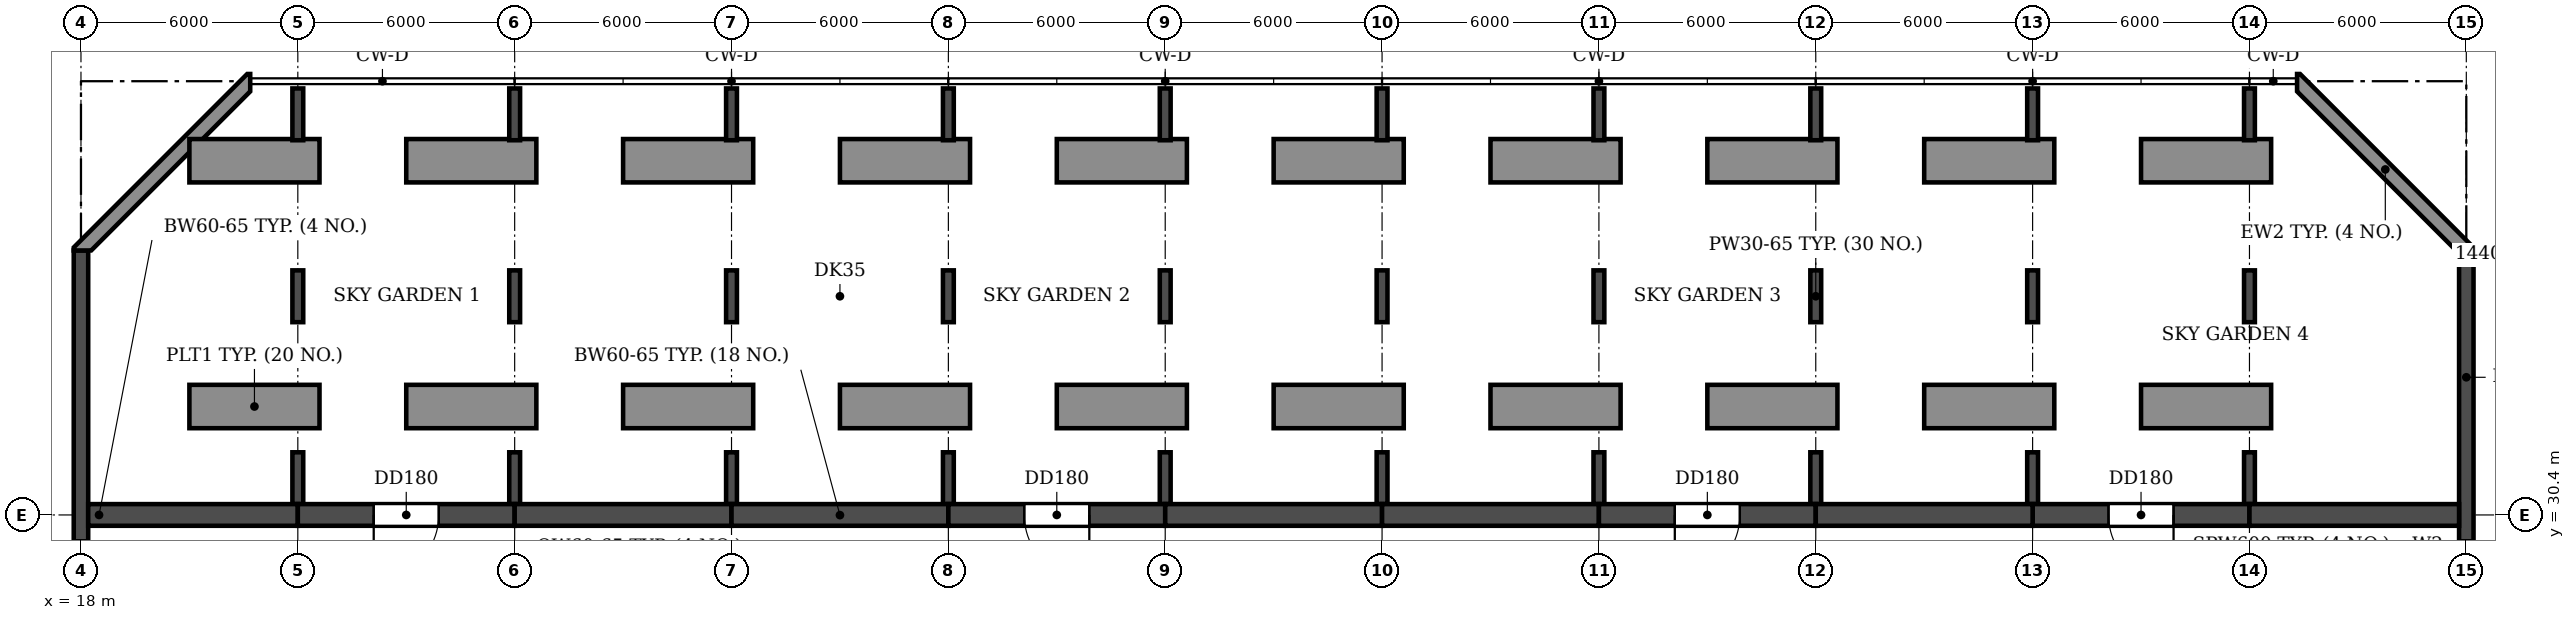
"""IFC4 building model, lengths in metres.
Left out: names, types, materials, properties, quantities, classifications, styles, units other than length and angle.
Written with IfcOpenShell. Run it as: python <this file> out.ifc"""

import sys

from ifc_helpers import new_model, si_unit, direction, frame, frame_2d, origin, place, context, subcontext, project, spatial, polyline, rectangle, outline, extrude, source, transform, mapped, element, fill, save


model = new_model("IFC4")
c1 = context("Model", 3, precision=1e-05, world=origin(), true_north=direction((0.0, 1.0)))
c2 = subcontext(c1, "Body", "Model", "MODEL_VIEW")
j1 = project(units=[si_unit("LENGTHUNIT", "METRE"), si_unit("PLANEANGLEUNIT", "RADIAN")], contexts=[c1])
p1 = place(None, origin())
s1 = spatial("IfcSite", under=j1, at=p1, CompositionType="ELEMENT")
p2 = place(p1, origin())
s2 = spatial("IfcBuilding", under=s1, at=p2, CompositionType="ELEMENT")
p3 = place(p2, frame((0.0, 0.0, 165.3)))
s3 = spatial("IfcBuildingStorey", under=s2, at=p3, CompositionType="ELEMENT", Elevation=165.3)
for number, where, z_axis, x_axis in (
    (1, (24.0, 30.7, 0.0), (0.0, 0.0, 1.0), (0.0, 1.0, 0.0)),
    (2, (24.0, 35.733, 0.0), (0.0, 0.0, 1.0), (0.0, 1.0, 0.0)),
    (3, (24.0, 40.767, 0.0), (0.0, 0.0, 1.0), (0.0, 1.0, 0.0)),
    (4, (30.0, 30.7, 0.0), (0.0, 0.0, 1.0), (0.0, 1.0, 0.0)),
    (5, (30.0, 35.733, 0.0), (0.0, 0.0, 1.0), (0.0, 1.0, 0.0)),
    (6, (30.0, 40.767, 0.0), (0.0, 0.0, 1.0), (0.0, 1.0, 0.0)),
    (7, (36.0, 30.7, 0.0), (0.0, 0.0, 1.0), (0.0, 1.0, 0.0)),
    (8, (36.0, 35.733, 0.0), (0.0, 0.0, 1.0), (0.0, 1.0, 0.0)),
    (9, (36.0, 40.767, 0.0), (0.0, 0.0, 1.0), (0.0, 1.0, 0.0)),
    (10, (42.0, 30.7, 0.0), (0.0, 0.0, 1.0), (0.0, 1.0, 0.0)),
    (11, (42.0, 35.733, 0.0), (0.0, 0.0, 1.0), (0.0, 1.0, 0.0)),
    (12, (42.0, 40.767, 0.0), (0.0, 0.0, 1.0), (0.0, 1.0, 0.0)),
    (13, (48.0, 30.7, 0.0), (0.0, 0.0, 1.0), (0.0, 1.0, 0.0)),
    (14, (48.0, 35.733, 0.0), (0.0, 0.0, 1.0), (0.0, 1.0, 0.0)),
    (15, (48.0, 40.767, 0.0), (0.0, 0.0, 1.0), (0.0, 1.0, 0.0)),
    (16, (54.0, 30.7, 0.0), (0.0, 0.0, 1.0), (0.0, 1.0, 0.0)),
    (17, (54.0, 35.733, 0.0), (0.0, 0.0, 1.0), (0.0, 1.0, 0.0)),
    (18, (54.0, 40.767, 0.0), (0.0, 0.0, 1.0), (0.0, 1.0, 0.0)),
    (19, (60.0, 30.7, 0.0), (0.0, 0.0, 1.0), (0.0, 1.0, 0.0)),
    (20, (60.0, 35.733, 0.0), (0.0, 0.0, 1.0), (0.0, 1.0, 0.0)),
    (21, (60.0, 40.767, 0.0), (0.0, 0.0, 1.0), (0.0, 1.0, 0.0)),
    (22, (66.0, 30.7, 0.0), (0.0, 0.0, 1.0), (0.0, 1.0, 0.0)),
    (23, (66.0, 35.733, 0.0), (0.0, 0.0, 1.0), (0.0, 1.0, 0.0)),
    (24, (66.0, 40.767, 0.0), (0.0, 0.0, 1.0), (0.0, 1.0, 0.0)),
    (25, (72.0, 30.7, 0.0), (0.0, 0.0, 1.0), (0.0, 1.0, 0.0)),
    (26, (72.0, 35.733, 0.0), (0.0, 0.0, 1.0), (0.0, 1.0, 0.0)),
    (27, (72.0, 40.767, 0.0), (0.0, 0.0, 1.0), (0.0, 1.0, 0.0)),
    (28, (78.0, 30.7, 0.0), (0.0, 0.0, 1.0), (0.0, 1.0, 0.0)),
    (29, (78.0, 35.733, 0.0), (0.0, 0.0, 1.0), (0.0, 1.0, 0.0)),
    (30, (78.0, 40.767, 0.0), (0.0, 0.0, 1.0), (0.0, 1.0, 0.0)),
):
    element("IfcWall", number, at=place(p3, frame(where, z_axis=z_axis, x_axis=x_axis)), inside=s3, PredefinedType="SHEAR", context=c2, shape_type="SweptSolid", body=[
        extrude(rectangle(XDim=1.433, YDim=0.3, at=frame_2d((0.717, 0.0))), origin(), (0.0, 0.0, 1.0), 6.38),
    ])
p4 = place(p3, frame((18.0, 4.683, 0.0), z_axis=(0.0, 0.0, 1.0), x_axis=(0.0, 1.0, 0.0)))
e31 = element("IfcWall", 31, at=p4, inside=s3, PredefinedType="SHEAR", context=c2, shape_type="SweptSolid", body=[
    extrude(rectangle(XDim=33.034, YDim=0.4, at=frame_2d((16.517, 0.0))), origin(), (0.0, 0.0, 1.0), 6.38),
])
p5 = place(p4, frame((23.817, 0.0, 0.9)))
e32 = element("IfcOpeningElement", 32, at=p5, cuts=e31, PredefinedType="OPENING", context=c2, shape_type="SweptSolid", body=[
    extrude(rectangle(XDim=1.2, YDim=1.5, at=frame_2d((0.6, 0.75))), frame((0.0, 0.21, 0.0), z_axis=(0.0, -1.0, 0.0), x_axis=(1.0, 0.0, 0.0)), (0.0, 0.0, 1.0), 0.42),
])
p6 = place(p4, frame((8.017, 0.0, 0.9)))
e33 = element("IfcOpeningElement", 33, at=p6, cuts=e31, PredefinedType="OPENING", context=c2, shape_type="SweptSolid", body=[
    extrude(rectangle(XDim=1.2, YDim=1.5, at=frame_2d((0.6, 0.75))), frame((0.0, 0.21, 0.0), z_axis=(0.0, -1.0, 0.0), x_axis=(1.0, 0.0, 0.0)), (0.0, 0.0, 1.0), 0.42),
])
p7 = place(p4, frame((15.917, 0.0, 0.9)))
e34 = element("IfcOpeningElement", 34, at=p7, cuts=e31, PredefinedType="OPENING", context=c2, shape_type="SweptSolid", body=[
    extrude(rectangle(XDim=1.2, YDim=1.5, at=frame_2d((0.6, 0.75))), frame((0.0, 0.21, 0.0), z_axis=(0.0, -1.0, 0.0), x_axis=(1.0, 0.0, 0.0)), (0.0, 0.0, 1.0), 0.42),
])
p8 = place(p3, frame((84.0, 4.683, 0.0), z_axis=(0.0, 0.0, 1.0), x_axis=(0.0, 1.0, 0.0)))
e35 = element("IfcWall", 35, at=p8, inside=s3, PredefinedType="SHEAR", context=c2, shape_type="SweptSolid", body=[
    extrude(rectangle(XDim=33.034, YDim=0.4, at=frame_2d((16.517, 0.0))), origin(), (0.0, 0.0, 1.0), 6.38),
])
p9 = place(p8, frame((23.817, 0.0, 0.9)))
e36 = element("IfcOpeningElement", 36, at=p9, cuts=e35, PredefinedType="OPENING", context=c2, shape_type="SweptSolid", body=[
    extrude(rectangle(XDim=1.2, YDim=1.5, at=frame_2d((0.6, 0.75))), frame((0.0, 0.21, 0.0), z_axis=(0.0, -1.0, 0.0), x_axis=(1.0, 0.0, 0.0)), (0.0, 0.0, 1.0), 0.42),
])
p10 = place(p8, frame((8.017, 0.0, 0.9)))
e37 = element("IfcOpeningElement", 37, at=p10, cuts=e35, PredefinedType="OPENING", context=c2, shape_type="SweptSolid", body=[
    extrude(rectangle(XDim=1.2, YDim=1.5, at=frame_2d((0.6, 0.75))), frame((0.0, 0.21, 0.0), z_axis=(0.0, -1.0, 0.0), x_axis=(1.0, 0.0, 0.0)), (0.0, 0.0, 1.0), 0.42),
])
p11 = place(p8, frame((15.917, 0.0, 0.9)))
e38 = element("IfcOpeningElement", 38, at=p11, cuts=e35, PredefinedType="OPENING", context=c2, shape_type="SweptSolid", body=[
    extrude(rectangle(XDim=1.2, YDim=1.5, at=frame_2d((0.6, 0.75))), frame((0.0, 0.21, 0.0), z_axis=(0.0, -1.0, 0.0), x_axis=(1.0, 0.0, 0.0)), (0.0, 0.0, 1.0), 0.42),
])
p12 = place(p3, frame((18.2, 30.4, 0.0), z_axis=(0.0, 0.0, 1.0), x_axis=(1.0, 0.0, 0.0)))
e39 = element("IfcWall", 39, at=p12, inside=s3, PredefinedType="SHEAR", context=c2, shape_type="SweptSolid", body=[
    extrude(rectangle(XDim=5.8, YDim=0.6, at=frame_2d((2.9, 0.0))), origin(), (0.0, 0.0, 1.0), 6.38),
])
p13 = place(p3, frame((24.0, 30.4, 0.0), z_axis=(0.0, 0.0, 1.0), x_axis=(1.0, 0.0, 0.0)))
e40 = element("IfcWall", 40, at=p13, inside=s3, PredefinedType="SHEAR", context=c2, shape_type="SweptSolid", body=[
    extrude(rectangle(XDim=6.0, YDim=0.6, at=frame_2d((3.0, 0.0))), origin(), (0.0, 0.0, 1.0), 6.38),
])
p14 = place(p13, frame((2.1, 0.0, 0.0)))
e41 = element("IfcOpeningElement", 41, at=p14, cuts=e40, PredefinedType="OPENING", context=c2, shape_type="SweptSolid", body=[
    extrude(rectangle(XDim=1.8, YDim=2.1, at=frame_2d((0.9, 1.05))), frame((0.0, 0.31, 0.0), z_axis=(0.0, -1.0, 0.0), x_axis=(1.0, 0.0, 0.0)), (0.0, 0.0, 1.0), 0.62),
])
for number, where, z_axis, x_axis in (
    (42, (30.0, 30.4, 0.0), (0.0, 0.0, 1.0), (1.0, 0.0, 0.0)),
    (43, (36.0, 30.4, 0.0), (0.0, 0.0, 1.0), (1.0, 0.0, 0.0)),
):
    element("IfcWall", number, at=place(p3, frame(where, z_axis=z_axis, x_axis=x_axis)), inside=s3, PredefinedType="SHEAR", context=c2, shape_type="SweptSolid", body=[
        extrude(rectangle(XDim=6.0, YDim=0.6, at=frame_2d((3.0, 0.0))), origin(), (0.0, 0.0, 1.0), 6.38),
    ])
p15 = place(p3, frame((42.0, 30.4, 0.0), z_axis=(0.0, 0.0, 1.0), x_axis=(1.0, 0.0, 0.0)))
e44 = element("IfcWall", 44, at=p15, inside=s3, PredefinedType="SHEAR", context=c2, shape_type="SweptSolid", body=[
    extrude(rectangle(XDim=6.0, YDim=0.6, at=frame_2d((3.0, 0.0))), origin(), (0.0, 0.0, 1.0), 6.38),
])
p16 = place(p15, frame((2.1, 0.0, 0.0)))
e45 = element("IfcOpeningElement", 45, at=p16, cuts=e44, PredefinedType="OPENING", context=c2, shape_type="SweptSolid", body=[
    extrude(rectangle(XDim=1.8, YDim=2.1, at=frame_2d((0.9, 1.05))), frame((0.0, 0.31, 0.0), z_axis=(0.0, -1.0, 0.0), x_axis=(1.0, 0.0, 0.0)), (0.0, 0.0, 1.0), 0.62),
])
for number, where, z_axis, x_axis in (
    (46, (48.0, 30.4, 0.0), (0.0, 0.0, 1.0), (1.0, 0.0, 0.0)),
    (47, (54.0, 30.4, 0.0), (0.0, 0.0, 1.0), (1.0, 0.0, 0.0)),
):
    element("IfcWall", number, at=place(p3, frame(where, z_axis=z_axis, x_axis=x_axis)), inside=s3, PredefinedType="SHEAR", context=c2, shape_type="SweptSolid", body=[
        extrude(rectangle(XDim=6.0, YDim=0.6, at=frame_2d((3.0, 0.0))), origin(), (0.0, 0.0, 1.0), 6.38),
    ])
p17 = place(p3, frame((60.0, 30.4, 0.0), z_axis=(0.0, 0.0, 1.0), x_axis=(1.0, 0.0, 0.0)))
e48 = element("IfcWall", 48, at=p17, inside=s3, PredefinedType="SHEAR", context=c2, shape_type="SweptSolid", body=[
    extrude(rectangle(XDim=6.0, YDim=0.6, at=frame_2d((3.0, 0.0))), origin(), (0.0, 0.0, 1.0), 6.38),
])
p18 = place(p17, frame((2.1, 0.0, 0.0)))
e49 = element("IfcOpeningElement", 49, at=p18, cuts=e48, PredefinedType="OPENING", context=c2, shape_type="SweptSolid", body=[
    extrude(rectangle(XDim=1.8, YDim=2.1, at=frame_2d((0.9, 1.05))), frame((0.0, 0.31, 0.0), z_axis=(0.0, -1.0, 0.0), x_axis=(1.0, 0.0, 0.0)), (0.0, 0.0, 1.0), 0.62),
])
p19 = place(p3, frame((66.0, 30.4, 0.0), z_axis=(0.0, 0.0, 1.0), x_axis=(1.0, 0.0, 0.0)))
e50 = element("IfcWall", 50, at=p19, inside=s3, PredefinedType="SHEAR", context=c2, shape_type="SweptSolid", body=[
    extrude(rectangle(XDim=6.0, YDim=0.6, at=frame_2d((3.0, 0.0))), origin(), (0.0, 0.0, 1.0), 6.38),
])
p20 = place(p3, frame((72.0, 30.4, 0.0), z_axis=(0.0, 0.0, 1.0), x_axis=(1.0, 0.0, 0.0)))
e51 = element("IfcWall", 51, at=p20, inside=s3, PredefinedType="SHEAR", context=c2, shape_type="SweptSolid", body=[
    extrude(rectangle(XDim=6.0, YDim=0.6, at=frame_2d((3.0, 0.0))), origin(), (0.0, 0.0, 1.0), 6.38),
])
p21 = place(p20, frame((2.1, 0.0, 0.0)))
e52 = element("IfcOpeningElement", 52, at=p21, cuts=e51, PredefinedType="OPENING", context=c2, shape_type="SweptSolid", body=[
    extrude(rectangle(XDim=1.8, YDim=2.1, at=frame_2d((0.9, 1.05))), frame((0.0, 0.31, 0.0), z_axis=(0.0, -1.0, 0.0), x_axis=(1.0, 0.0, 0.0)), (0.0, 0.0, 1.0), 0.62),
])
p22 = place(p3, frame((78.0, 30.4, 0.0), z_axis=(0.0, 0.0, 1.0), x_axis=(1.0, 0.0, 0.0)))
e53 = element("IfcWall", 53, at=p22, inside=s3, PredefinedType="SHEAR", context=c2, shape_type="SweptSolid", body=[
    extrude(rectangle(XDim=5.8, YDim=0.6, at=frame_2d((2.9, 0.0))), origin(), (0.0, 0.0, 1.0), 6.38),
])
p23 = place(p3, origin())
e54 = element("IfcWall", 54, at=p23, inside=s3, PredefinedType="STANDARD", context=c2, shape_type="SweptSolid", body=[
    extrude(outline(polyline([(84.2, 37.717), (84.2, 37.8), (79.4, 42.6), (79.317, 42.6), (79.317, 42.117), (83.717, 37.717), (84.2, 37.717)])), origin(), (0.0, 0.0, 1.0), 6.38),
])
p24 = place(p3, origin())
e55 = element("IfcWall", 55, at=p24, inside=s3, PredefinedType="STANDARD", context=c2, shape_type="SweptSolid", body=[
    extrude(outline(polyline([(22.683, 42.6), (22.6, 42.6), (17.8, 37.8), (17.8, 37.717), (18.283, 37.717), (22.683, 42.117), (22.683, 42.6)])), origin(), (0.0, 0.0, 1.0), 6.38),
])
m1 = source(origin(), c2, "Body", "SweptSolid", [
    extrude(outline(polyline([(0.0, 0.0), (3.6, 0.0), (3.6, 1.2), (0.0, 1.2), (0.0, 0.0)])), origin(), (0.0, 0.0, 1.0), 0.6),
])
for number, where in (
    (56, (21.0, 32.8, 0.0)),
    (57, (27.0, 32.8, 0.0)),
    (58, (33.0, 32.8, 0.0)),
    (59, (39.0, 32.8, 0.0)),
    (60, (45.0, 32.8, 0.0)),
    (61, (51.0, 32.8, 0.0)),
    (62, (57.0, 32.8, 0.0)),
    (63, (63.0, 32.8, 0.0)),
    (64, (69.0, 32.8, 0.0)),
    (65, (75.0, 32.8, 0.0)),
    (66, (21.0, 39.6, 0.0)),
    (67, (27.0, 39.6, 0.0)),
    (68, (33.0, 39.6, 0.0)),
    (69, (39.0, 39.6, 0.0)),
    (70, (45.0, 39.6, 0.0)),
    (71, (51.0, 39.6, 0.0)),
    (72, (57.0, 39.6, 0.0)),
    (73, (63.0, 39.6, 0.0)),
    (74, (69.0, 39.6, 0.0)),
    (75, (75.0, 39.6, 0.0)),
):
    element("IfcWall", number, at=place(p3, frame(where)), inside=s3, PredefinedType="USERDEFINED", context=c2, shape_type="MappedRepresentation", body=[
        mapped(m1, transform((0.0, 0.0, 0.0))),
    ])
p25 = place(p9, origin())
e76 = element("IfcWindow", 76, at=p25, inside=s3, PartitioningType="SINGLE_PANEL", PredefinedType="WINDOW", context=c2, shape_type="SweptSolid", body=[
    extrude(rectangle(XDim=1.2, YDim=1.5, at=frame_2d((0.6, 0.75))), frame((0.0, 0.03, 0.0), z_axis=(0.0, -1.0, 0.0), x_axis=(1.0, 0.0, 0.0)), (0.0, 0.0, 1.0), 0.06),
])
fill(e36, e76)
p26 = place(p5, origin())
e77 = element("IfcWindow", 77, at=p26, inside=s3, PartitioningType="SINGLE_PANEL", PredefinedType="WINDOW", context=c2, shape_type="SweptSolid", body=[
    extrude(rectangle(XDim=1.2, YDim=1.5, at=frame_2d((0.6, 0.75))), frame((0.0, 0.03, 0.0), z_axis=(0.0, -1.0, 0.0), x_axis=(1.0, 0.0, 0.0)), (0.0, 0.0, 1.0), 0.06),
])
fill(e32, e77)
p27 = place(p14, frame((1.8, 0.0, 0.0), z_axis=(0.0, 0.0, 1.0), x_axis=(-1.0, 0.0, 0.0)))
e78 = element("IfcDoor", 78, at=p27, inside=s3, OperationType="DOUBLE_DOOR_SINGLE_SWING", PredefinedType="DOOR", context=c2, shape_type="SweptSolid", body=[
    extrude(rectangle(XDim=1.8, YDim=2.1, at=frame_2d((0.9, 1.05))), frame((0.0, 0.025, 0.0), z_axis=(0.0, -1.0, 0.0), x_axis=(1.0, 0.0, 0.0)), (0.0, 0.0, 1.0), 0.05),
])
fill(e41, e78)
p28 = place(p16, frame((1.8, 0.0, 0.0), z_axis=(0.0, 0.0, 1.0), x_axis=(-1.0, 0.0, 0.0)))
e79 = element("IfcDoor", 79, at=p28, inside=s3, OperationType="DOUBLE_DOOR_SINGLE_SWING", PredefinedType="DOOR", context=c2, shape_type="SweptSolid", body=[
    extrude(rectangle(XDim=1.8, YDim=2.1, at=frame_2d((0.9, 1.05))), frame((0.0, 0.025, 0.0), z_axis=(0.0, -1.0, 0.0), x_axis=(1.0, 0.0, 0.0)), (0.0, 0.0, 1.0), 0.05),
])
fill(e45, e79)
p29 = place(p18, frame((1.8, 0.0, 0.0), z_axis=(0.0, 0.0, 1.0), x_axis=(-1.0, 0.0, 0.0)))
e80 = element("IfcDoor", 80, at=p29, inside=s3, OperationType="DOUBLE_DOOR_SINGLE_SWING", PredefinedType="DOOR", context=c2, shape_type="SweptSolid", body=[
    extrude(rectangle(XDim=1.8, YDim=2.1, at=frame_2d((0.9, 1.05))), frame((0.0, 0.025, 0.0), z_axis=(0.0, -1.0, 0.0), x_axis=(1.0, 0.0, 0.0)), (0.0, 0.0, 1.0), 0.05),
])
fill(e49, e80)
p30 = place(p21, frame((1.8, 0.0, 0.0), z_axis=(0.0, 0.0, 1.0), x_axis=(-1.0, 0.0, 0.0)))
e81 = element("IfcDoor", 81, at=p30, inside=s3, OperationType="DOUBLE_DOOR_SINGLE_SWING", PredefinedType="DOOR", context=c2, shape_type="SweptSolid", body=[
    extrude(rectangle(XDim=1.8, YDim=2.1, at=frame_2d((0.9, 1.05))), frame((0.0, 0.025, 0.0), z_axis=(0.0, -1.0, 0.0), x_axis=(1.0, 0.0, 0.0)), (0.0, 0.0, 1.0), 0.05),
])
fill(e52, e81)
save(model, sys.argv[1])
